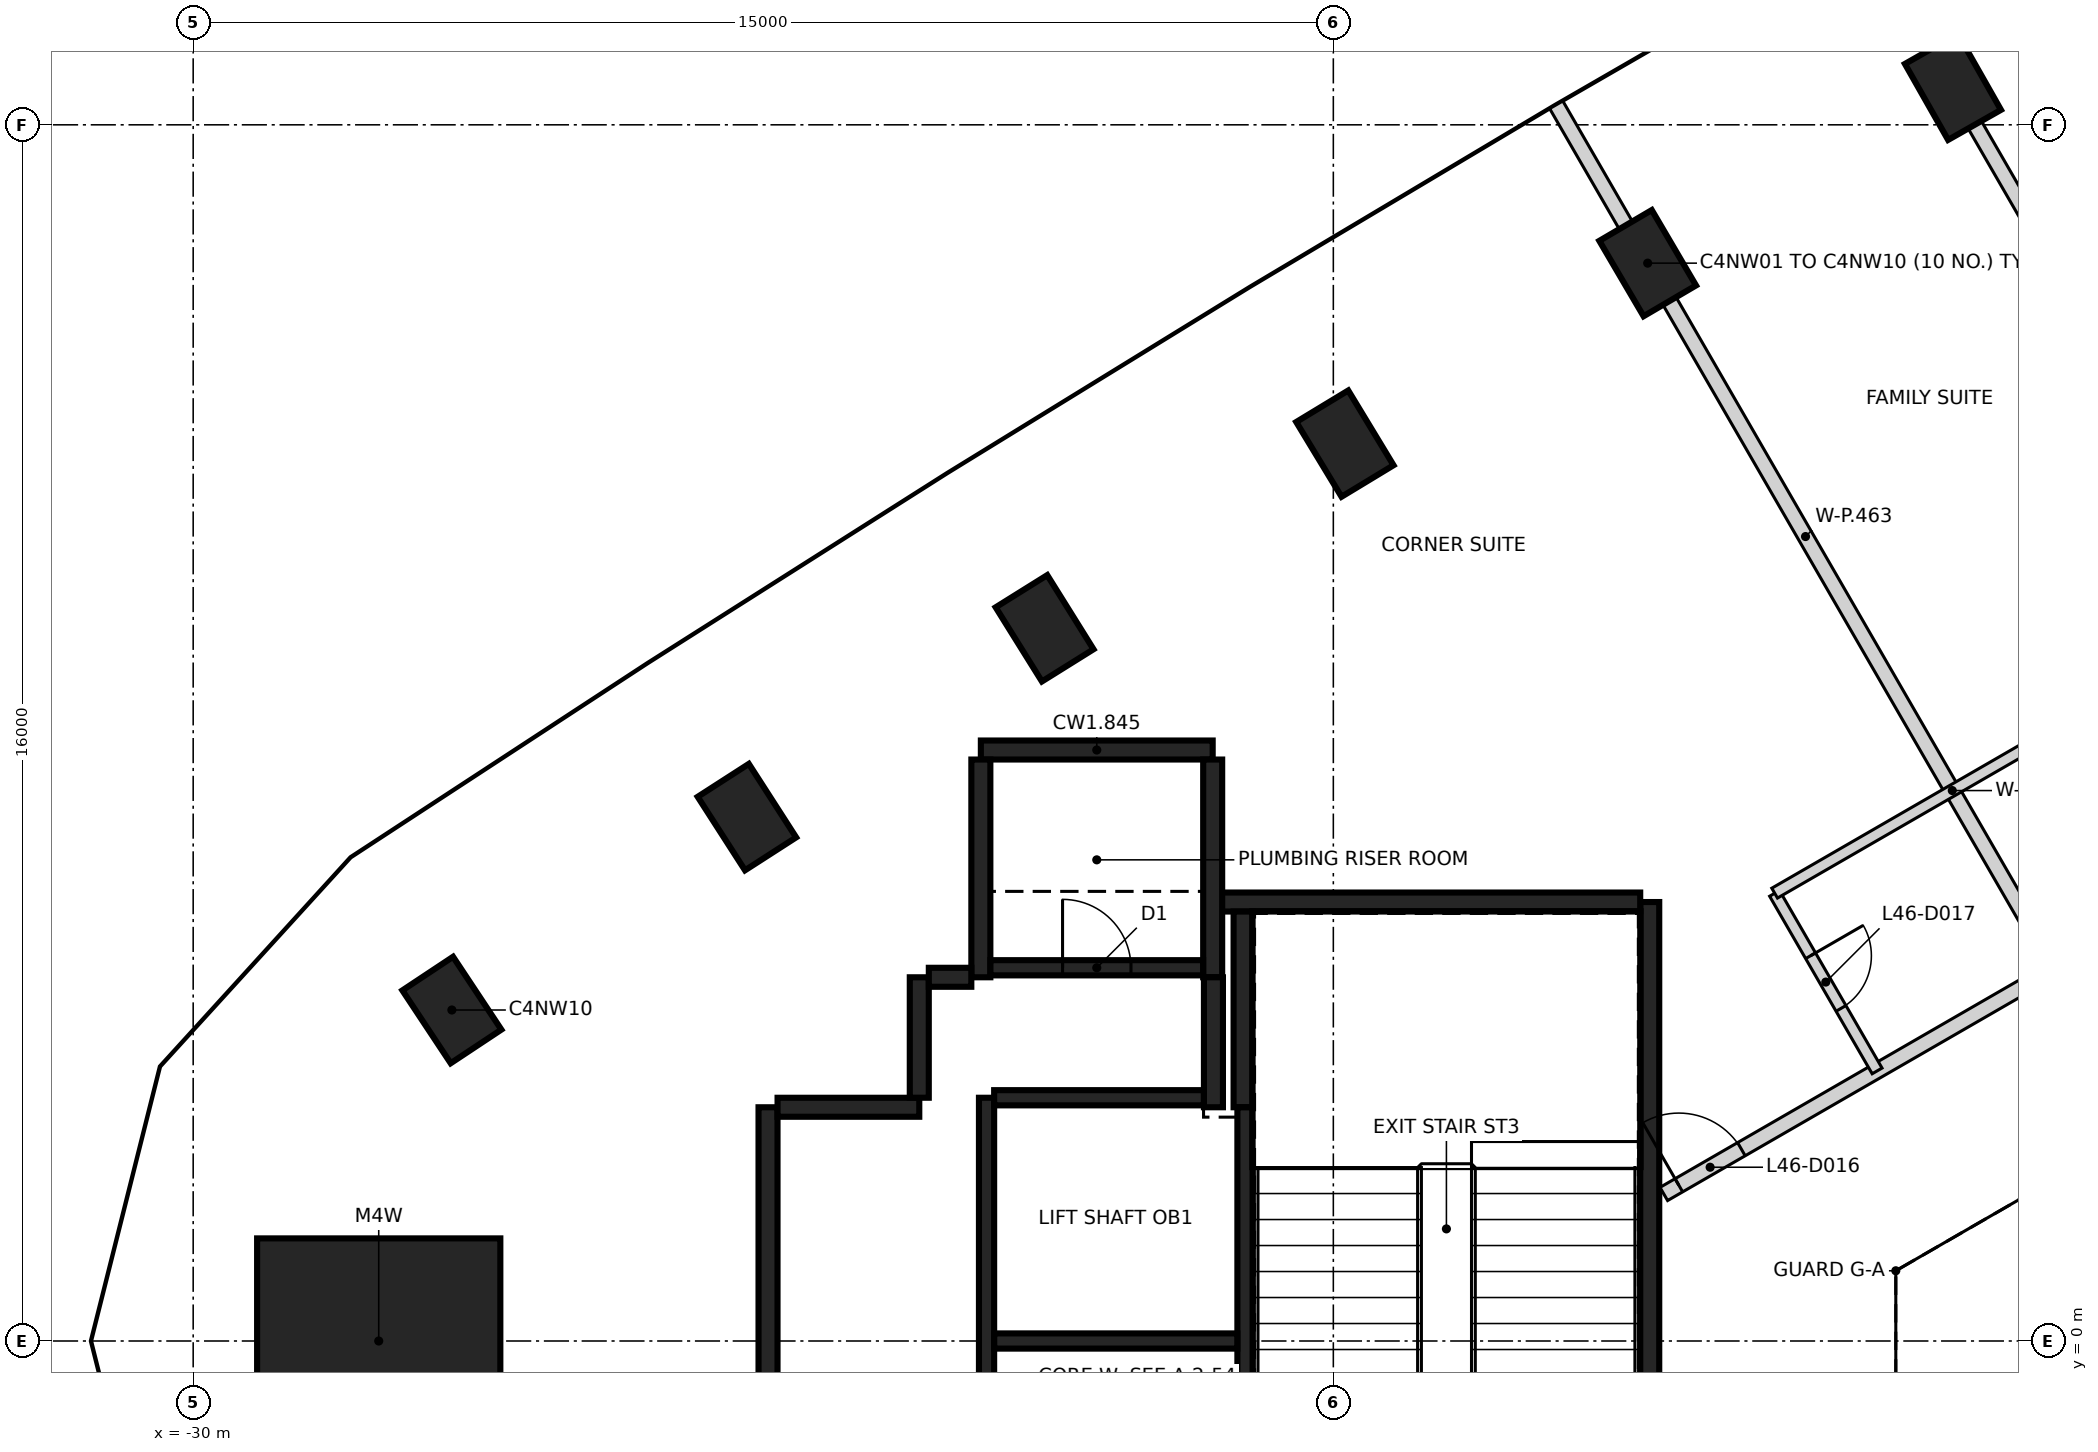
"""IFC4 building model, lengths in metres.
Left out: names, types, materials, properties, quantities, classifications, styles, units other than length and angle.
Written with IfcOpenShell. Run it as: python <this file> out.ifc"""

import sys

from ifc_helpers import new_model, si_unit, direction, frame, frame_2d, origin, origin_2d, place, context, subcontext, project, spatial, rectangle, extrude, element, fill, save


model = new_model("IFC4")
c1 = context("Model", 3, precision=1e-05, world=origin(), true_north=direction((0.0, 1.0)))
c2 = subcontext(c1, "Body", "Model", "MODEL_VIEW")
j1 = project(units=[si_unit("LENGTHUNIT", "METRE"), si_unit("PLANEANGLEUNIT", "RADIAN")], contexts=[c1])
p1 = place(None, origin())
s1 = spatial("IfcSite", under=j1, at=p1, CompositionType="ELEMENT")
p2 = place(p1, origin())
s2 = spatial("IfcBuilding", under=s1, at=p2, CompositionType="ELEMENT")
p3 = place(p2, frame((0.0, 0.0, 186.4)))
s3 = spatial("IfcBuildingStorey", under=s2, at=p3, CompositionType="ELEMENT", Elevation=186.4)
for number, where, z_axis, x_axis in (
    (1, (-6.848, 16.499, -0.35), (0.0, 0.0, 1.0), (-0.494, 0.87, 0.0)),
    (2, (-10.864, 14.18, -0.35), (0.0, 0.0, 1.0), (-0.506, 0.862, 0.0)),
    (3, (-14.848, 11.806, -0.35), (0.0, 0.0, 1.0), (-0.518, 0.855, 0.0)),
    (4, (-18.799, 9.376, -0.35), (0.0, 0.0, 1.0), (-0.529, 0.848, 0.0)),
    (5, (-22.715, 6.892, -0.35), (0.0, 0.0, 1.0), (-0.541, 0.841, 0.0)),
    (6, (-26.597, 4.354, -0.35), (0.0, 0.0, 1.0), (-0.553, 0.833, 0.0)),
):
    element("IfcColumn", number, at=place(p3, frame(where, z_axis=z_axis, x_axis=x_axis)), inside=s3, PredefinedType="COLUMN", context=c2, shape_type="SweptSolid", body=[
        extrude(rectangle(XDim=1.15, YDim=0.8, at=origin_2d()), origin(), (0.0, 0.0, 1.0), 3.6),
    ])
p4 = place(p3, frame((-27.559, 0.0, -0.35), z_axis=(0.0, 0.0, 1.0), x_axis=(1.0, 0.0, 0.0)))
e7 = element("IfcColumn", 7, at=p4, inside=s3, PredefinedType="COLUMN", context=c2, shape_type="SweptSolid", body=[
    extrude(rectangle(XDim=3.2, YDim=2.7, at=origin_2d()), origin(), (0.0, 0.0, 1.0), 3.6),
])
p5 = place(p3, frame((-10.837, 5.775, 0.0), z_axis=(0.0, 0.0, 1.0), x_axis=(0.0, -1.0, 0.0)))
e8 = element("IfcWall", 8, at=p5, inside=s3, PredefinedType="SHEAR", context=c2, shape_type="SweptSolid", body=[
    extrude(rectangle(XDim=11.55, YDim=0.25, at=frame_2d((5.775, 0.0))), origin(), (0.0, 0.0, 1.0), 3.25),
])
p6 = place(p5, frame((10.025, 0.0, 0.0)))
e9 = element("IfcOpeningElement", 9, at=p6, cuts=e8, PredefinedType="OPENING", context=c2, shape_type="SweptSolid", body=[
    extrude(rectangle(XDim=1.2, YDim=2.1, at=frame_2d((0.6, 1.05))), frame((0.0, 0.135, 0.0), z_axis=(0.0, -1.0, 0.0), x_axis=(1.0, 0.0, 0.0)), (0.0, 0.0, 1.0), 0.27),
])
p7 = place(p5, frame((8.725, 0.0, 0.0)))
e10 = element("IfcOpeningElement", 10, at=p7, cuts=e8, PredefinedType="OPENING", context=c2, shape_type="SweptSolid", body=[
    extrude(rectangle(XDim=1.2, YDim=2.1, at=frame_2d((0.6, 1.05))), frame((0.0, 0.135, 0.0), z_axis=(0.0, -1.0, 0.0), x_axis=(1.0, 0.0, 0.0)), (0.0, 0.0, 1.0), 0.27),
])
p8 = place(p3, frame((-22.437, -5.675, 0.0), z_axis=(0.0, 0.0, 1.0), x_axis=(0.0, 1.0, 0.0)))
e11 = element("IfcWall", 11, at=p8, inside=s3, PredefinedType="SHEAR", context=c2, shape_type="SweptSolid", body=[
    extrude(rectangle(XDim=8.75, YDim=0.25, at=frame_2d((4.375, 0.0))), origin(), (0.0, 0.0, 1.0), 3.25),
])
p9 = place(p3, frame((-16.472, 5.775, 0.0), z_axis=(0.0, 0.0, 1.0), x_axis=(1.0, 0.0, 0.0)))
e12 = element("IfcWall", 12, at=p9, inside=s3, PredefinedType="SHEAR", context=c2, shape_type="SweptSolid", body=[
    extrude(rectangle(XDim=5.51, YDim=0.25, at=frame_2d((2.755, 0.0))), origin(), (0.0, 0.0, 1.0), 3.25),
])
p10 = place(p3, frame((-19.637, 7.775, 0.0), z_axis=(0.0, 0.0, 1.0), x_axis=(1.0, 0.0, 0.0)))
e13 = element("IfcWall", 13, at=p10, inside=s3, PredefinedType="SHEAR", context=c2, shape_type="SweptSolid", body=[
    extrude(rectangle(XDim=3.05, YDim=0.25, at=frame_2d((1.525, 0.0))), origin(), (0.0, 0.0, 1.0), 3.25),
])
for number, where, z_axis, x_axis in (
    (14, (-16.587, 7.65, 0.0), (0.0, 0.0, 1.0), (0.0, -1.0, 0.0)),
    (15, (-19.637, 4.785, 0.0), (0.0, 0.0, 1.0), (0.0, 1.0, 0.0)),
):
    element("IfcWall", number, at=place(p3, frame(where, z_axis=z_axis, x_axis=x_axis)), inside=s3, PredefinedType="SHEAR", context=c2, shape_type="SweptSolid", body=[
        extrude(rectangle(XDim=2.865, YDim=0.25, at=frame_2d((1.432, 0.0))), origin(), (0.0, 0.0, 1.0), 3.25),
    ])
p11 = place(p3, frame((-16.187, 3.075, 0.0), z_axis=(0.0, 0.0, 1.0), x_axis=(0.0, 1.0, 0.0)))
e16 = element("IfcWall", 16, at=p11, inside=s3, PredefinedType="SHEAR", context=c2, shape_type="SweptSolid", body=[
    extrude(rectangle(XDim=2.575, YDim=0.25, at=frame_2d((1.287, 0.0))), origin(), (0.0, 0.0, 1.0), 3.25),
])
p12 = place(p3, frame((-22.312, 3.075, 0.0), z_axis=(0.0, 0.0, 1.0), x_axis=(1.0, 0.0, 0.0)))
e17 = element("IfcWall", 17, at=p12, inside=s3, PredefinedType="SHEAR", context=c2, shape_type="SweptSolid", body=[
    extrude(rectangle(XDim=1.865, YDim=0.25, at=frame_2d((0.932, 0.0))), origin(), (0.0, 0.0, 1.0), 3.25),
])
p13 = place(p3, frame((-16.577, 4.785, 0.0), z_axis=(0.0, 0.0, 1.0), x_axis=(0.0, -1.0, 0.0)))
e18 = element("IfcWall", 18, at=p13, inside=s3, PredefinedType="SHEAR", context=c2, shape_type="SweptSolid", body=[
    extrude(rectangle(XDim=1.71, YDim=0.25, at=frame_2d((0.855, 0.0))), origin(), (0.0, 0.0, 1.0), 3.25),
])
p14 = place(p3, frame((-20.447, 3.2, 0.0), z_axis=(0.0, 0.0, 1.0), x_axis=(0.0, 1.0, 0.0)))
e19 = element("IfcWall", 19, at=p14, inside=s3, PredefinedType="SHEAR", context=c2, shape_type="SweptSolid", body=[
    extrude(rectangle(XDim=1.584, YDim=0.25, at=frame_2d((0.792, 0.0))), origin(), (0.0, 0.0, 1.0), 3.25),
])
p15 = place(p3, frame((-20.322, 4.785, 0.0), z_axis=(0.0, 0.0, 1.0), x_axis=(1.0, 0.0, 0.0)))
e20 = element("IfcWall", 20, at=p15, inside=s3, PredefinedType="SHEAR", context=c2, shape_type="SweptSolid", body=[
    extrude(rectangle(XDim=0.559, YDim=0.25, at=frame_2d((0.28, 0.0))), origin(), (0.0, 0.0, 1.0), 3.25),
])
p16 = place(p3, frame((-16.162, 3.074, 0.0), z_axis=(0.0, 0.0, 1.0), x_axis=(0.0, -1.0, 0.0)))
e21 = element("IfcWall", 21, at=p16, inside=s3, PredefinedType="SHEAR", context=c2, shape_type="SweptSolid", body=[
    extrude(rectangle(XDim=5.974, YDim=0.2, at=frame_2d((2.987, 0.0))), origin(), (0.0, 0.0, 1.0), 3.25),
])
p17 = place(p3, frame((-19.562, -2.9, 0.0), z_axis=(0.0, 0.0, 1.0), x_axis=(0.0, 1.0, 0.0)))
e22 = element("IfcWall", 22, at=p17, inside=s3, PredefinedType="SHEAR", context=c2, shape_type="SweptSolid", body=[
    extrude(rectangle(XDim=6.1, YDim=0.2, at=frame_2d((3.05, 0.0))), origin(), (0.0, 0.0, 1.0), 3.25),
])
p18 = place(p3, frame((-16.263, 0.0, 0.0), z_axis=(0.0, 0.0, 1.0), x_axis=(-1.0, 0.0, 0.0)))
e23 = element("IfcWall", 23, at=p18, inside=s3, PredefinedType="SHEAR", context=c2, shape_type="SweptSolid", body=[
    extrude(rectangle(XDim=3.198, YDim=0.2, at=frame_2d((1.599, 0.0))), origin(), (0.0, 0.0, 1.0), 3.25),
])
p19 = place(p3, frame((-19.511, 4.91, 0.0), z_axis=(0.0, 0.0, 1.0), x_axis=(1.0, 0.0, 0.0)))
e24 = element("IfcWall", 24, at=p19, inside=s3, PredefinedType="SHEAR", context=c2, shape_type="SweptSolid", body=[
    extrude(rectangle(XDim=2.798, YDim=0.2, at=frame_2d((1.399, 0.0))), origin(), (0.0, 0.0, 1.0), 3.25),
])
p20 = place(p19, frame((0.949, 0.0, 0.0)))
e25 = element("IfcOpeningElement", 25, at=p20, cuts=e24, PredefinedType="OPENING", context=c2, shape_type="SweptSolid", body=[
    extrude(rectangle(XDim=0.9, YDim=2.1, at=frame_2d((0.45, 1.05))), frame((0.0, 0.11, 0.0), z_axis=(0.0, -1.0, 0.0), x_axis=(1.0, 0.0, 0.0)), (0.0, 0.0, 1.0), 0.22),
])
p21 = place(p3, frame((-19.462, 3.2, 0.0), z_axis=(0.0, 0.0, 1.0), x_axis=(1.0, 0.0, 0.0)))
e26 = element("IfcWall", 26, at=p21, inside=s3, PredefinedType="SHEAR", context=c2, shape_type="SweptSolid", body=[
    extrude(rectangle(XDim=2.759, YDim=0.2, at=frame_2d((1.379, 0.0))), origin(), (0.0, 0.0, 1.0), 3.25),
])
p22 = place(p3, frame((-10.652, 1.934, 0.0), z_axis=(0.0, 0.0, 1.0), x_axis=(0.866066882415, 0.499928150021, 0.0)))
e27 = element("IfcWall", 27, at=p22, inside=s3, PredefinedType="PARTITIONING", context=c2, shape_type="SweptSolid", body=[
    extrude(rectangle(XDim=12.98, YDim=0.2, at=frame_2d((6.49, 0.0))), origin(), (0.0, 0.0, 1.0), 3.25),
])
p23 = place(p22, frame((9.439, 0.0, 0.0)))
e28 = element("IfcOpeningElement", 28, at=p23, cuts=e27, PredefinedType="OPENING", context=c2, shape_type="SweptSolid", body=[
    extrude(rectangle(XDim=0.95, YDim=2.1, at=frame_2d((0.475, 1.05))), frame((0.0, 0.11, 0.0), z_axis=(0.0, -1.0, 0.0), x_axis=(1.0, 0.0, 0.0)), (0.0, 0.0, 1.0), 0.22),
])
p24 = place(p22, frame((0.229, 0.0, 0.0)))
e29 = element("IfcOpeningElement", 29, at=p24, cuts=e27, PredefinedType="OPENING", context=c2, shape_type="SweptSolid", body=[
    extrude(rectangle(XDim=0.95, YDim=2.1, at=frame_2d((0.475, 1.05))), frame((0.0, 0.11, 0.0), z_axis=(0.0, -1.0, 0.0), x_axis=(1.0, 0.0, 0.0)), (0.0, 0.0, 1.0), 0.22),
])
p25 = place(p3, frame((-12.067, 16.263, 0.0), z_axis=(0.0, 0.0, 1.0), x_axis=(0.500016190239, -0.866016056144, 0.0)))
e30 = element("IfcWall", 30, at=p25, inside=s3, PredefinedType="PARTITIONING", context=c2, shape_type="SweptSolid", body=[
    extrude(rectangle(XDim=13.118, YDim=0.2, at=frame_2d((6.559, 0.0))), origin(), (0.0, 0.0, 1.0), 3.25),
])
p26 = place(p3, frame((-8.052, 18.582, 0.0), z_axis=(0.0, 0.0, 1.0), x_axis=(0.500046266189, -0.86599869034, 0.0)))
e31 = element("IfcWall", 31, at=p26, inside=s3, PredefinedType="PARTITIONING", context=c2, shape_type="SweptSolid", body=[
    extrude(rectangle(XDim=13.118, YDim=0.2, at=frame_2d((6.559, 0.0))), origin(), (0.0, 0.0, 1.0), 3.25),
])
p27 = place(p3, frame((-9.195, 5.889, 0.0), z_axis=(0.0, 0.0, 1.0), x_axis=(0.500129820725, -0.865950438779, 0.0)))
e32 = element("IfcWall", 32, at=p27, inside=s3, PredefinedType="PARTITIONING", context=c2, shape_type="SweptSolid", body=[
    extrude(rectangle(XDim=2.698, YDim=0.15, at=frame_2d((1.349, 0.0))), origin(), (0.0, 0.0, 1.0), 3.25),
])
p28 = place(p27, frame((0.948, 0.0, 0.0)))
e33 = element("IfcOpeningElement", 33, at=p28, cuts=e32, PredefinedType="OPENING", context=c2, shape_type="SweptSolid", body=[
    extrude(rectangle(XDim=0.8, YDim=2.1, at=frame_2d((0.4, 1.05))), frame((0.0, 0.085, 0.0), z_axis=(0.0, -1.0, 0.0), x_axis=(1.0, 0.0, 0.0)), (0.0, 0.0, 1.0), 0.17),
])
p29 = place(p3, frame((-9.194, 5.892, 0.0), z_axis=(0.0, 0.0, 1.0), x_axis=(0.8659934935, 0.500055266161, 0.0)))
e34 = element("IfcWall", 34, at=p29, inside=s3, PredefinedType="PARTITIONING", context=c2, shape_type="SweptSolid", body=[
    extrude(rectangle(XDim=5.397, YDim=0.15, at=frame_2d((2.699, 0.0))), origin(), (0.0, 0.0, 1.0), 3.25),
])
p30 = place(p20, origin())
e35 = element("IfcDoor", 35, at=p30, inside=s3, OperationType="SINGLE_SWING_RIGHT", PredefinedType="DOOR", context=c2, shape_type="SweptSolid", body=[
    extrude(rectangle(XDim=0.9, YDim=2.1, at=frame_2d((0.45, 1.05))), frame((0.0, 0.025, 0.0), z_axis=(0.0, -1.0, 0.0), x_axis=(1.0, 0.0, 0.0)), (0.0, 0.0, 1.0), 0.05),
])
fill(e25, e35)
p31 = place(p24, origin())
e36 = element("IfcDoor", 36, at=p31, inside=s3, OperationType="SINGLE_SWING_LEFT", PredefinedType="DOOR", context=c2, shape_type="SweptSolid", body=[
    extrude(rectangle(XDim=0.95, YDim=2.1, at=frame_2d((0.475, 1.05))), frame((0.0, 0.025, 0.0), z_axis=(0.0, -1.0, 0.0), x_axis=(1.0, 0.0, 0.0)), (0.0, 0.0, 1.0), 0.05),
])
fill(e29, e36)
p32 = place(p28, frame((0.8, 0.0, 0.0), z_axis=(0.0, 0.0, 1.0), x_axis=(-1.0, 0.0, 0.0)))
e37 = element("IfcDoor", 37, at=p32, inside=s3, OperationType="SINGLE_SWING_LEFT", PredefinedType="DOOR", context=c2, shape_type="SweptSolid", body=[
    extrude(rectangle(XDim=0.8, YDim=2.1, at=frame_2d((0.4, 1.05))), frame((0.0, 0.025, 0.0), z_axis=(0.0, -1.0, 0.0), x_axis=(1.0, 0.0, 0.0)), (0.0, 0.0, 1.0), 0.05),
])
fill(e33, e37)
save(model, sys.argv[1])
